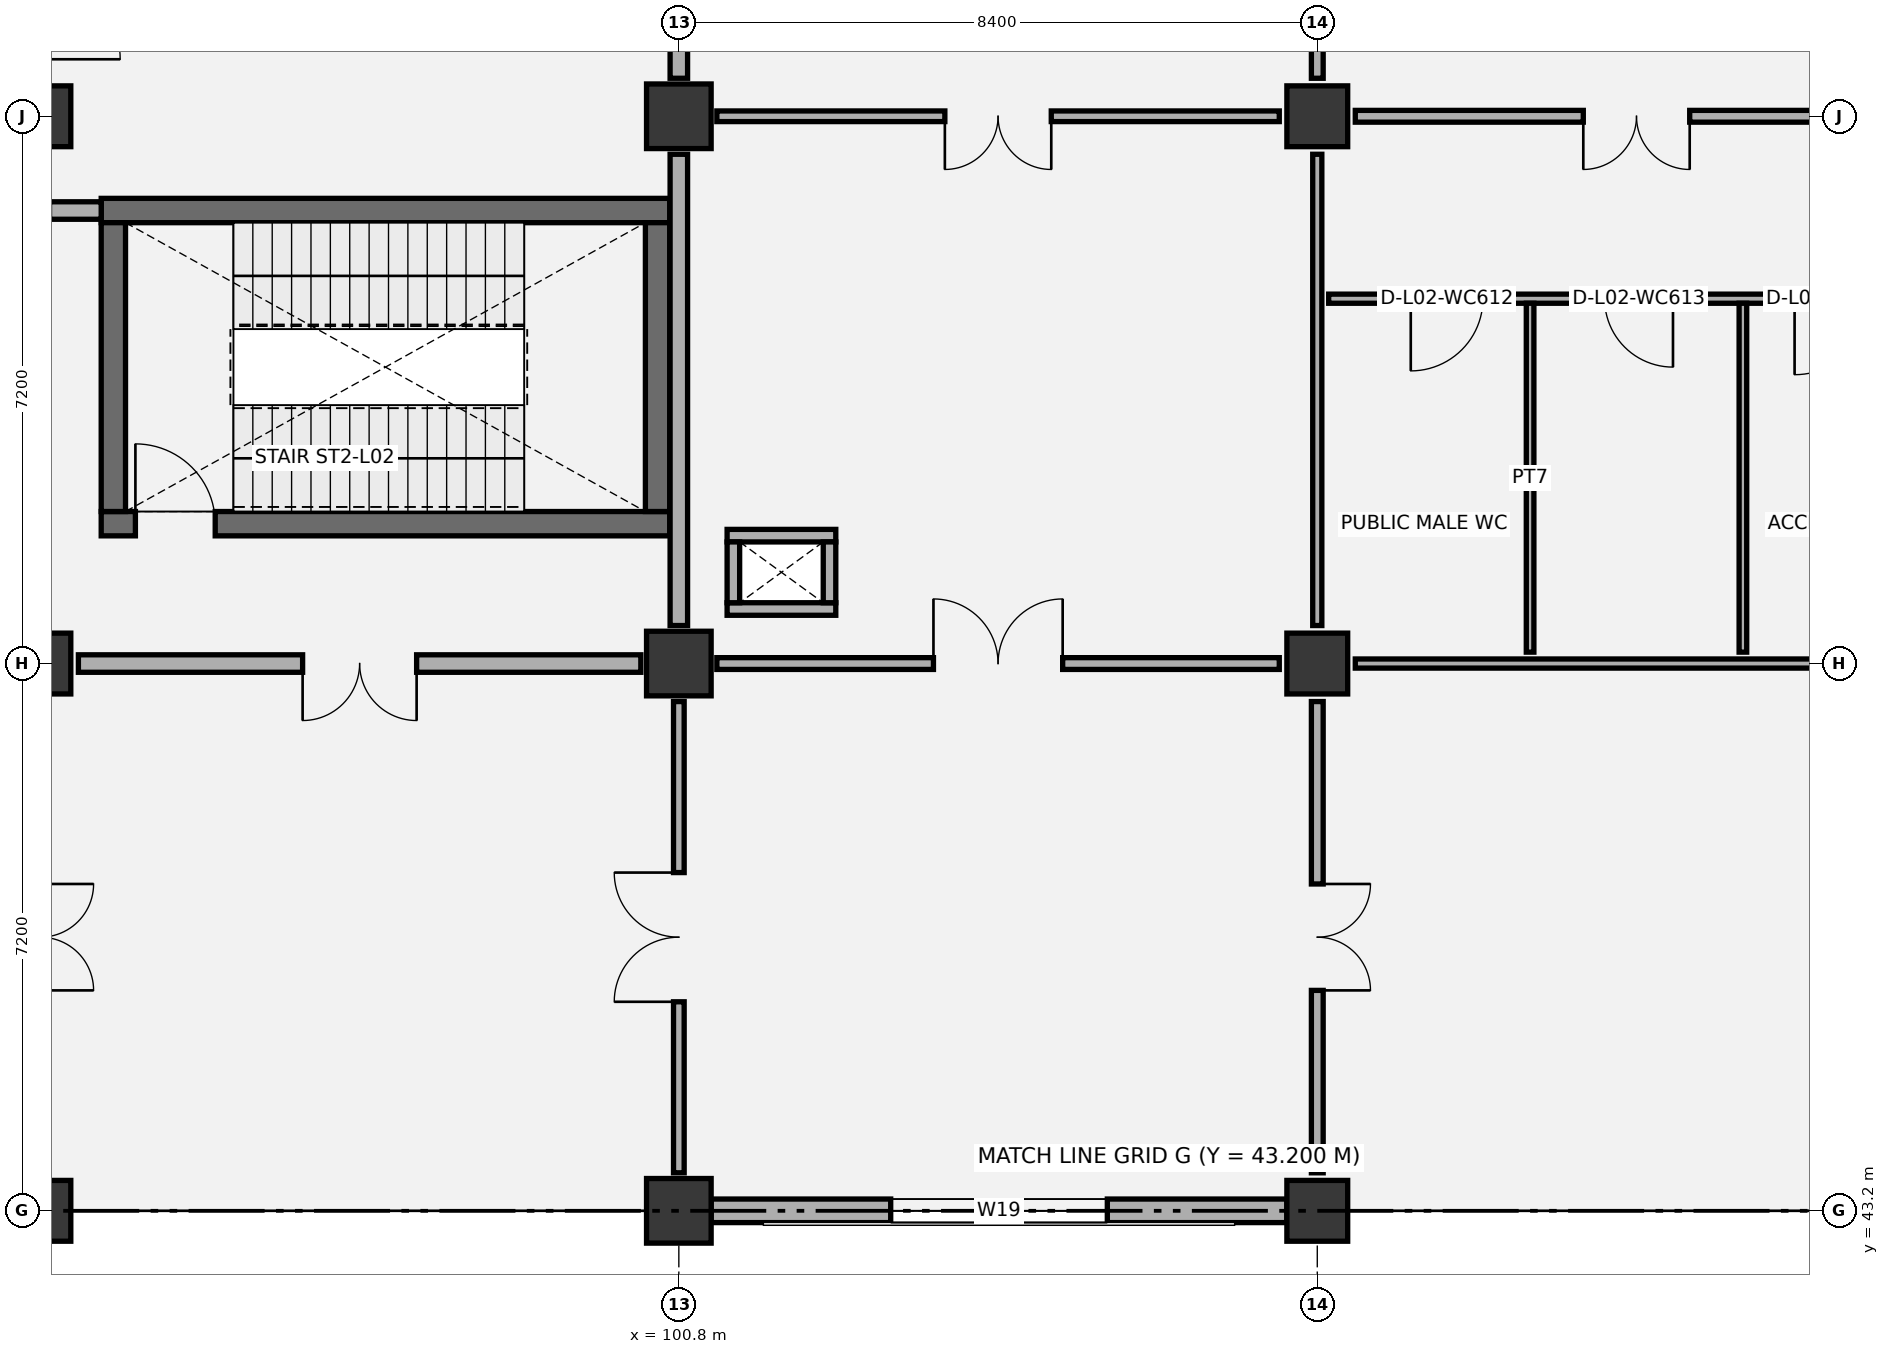
"""IFC4 building model, lengths in metres.
Left out: names, types, materials, properties, quantities, classifications, styles, units other than length and angle.
Written with IfcOpenShell. Run it as: python <this file> out.ifc"""

import sys

from ifc_helpers import new_model, si_unit, direction, frame, frame_2d, origin, origin_2d, place, context, subcontext, project, spatial, rectangle, extrude, element, fill, save


model = new_model("IFC4")
c1 = context("Model", 3, precision=1e-05, world=origin(), true_north=direction((0.0, 1.0)))
c2 = subcontext(c1, "Body", "Model", "MODEL_VIEW")
j1 = project(units=[si_unit("LENGTHUNIT", "METRE"), si_unit("PLANEANGLEUNIT", "RADIAN")], contexts=[c1])
p1 = place(None, origin())
s1 = spatial("IfcSite", under=j1, at=p1, CompositionType="ELEMENT")
p2 = place(p1, origin())
s2 = spatial("IfcBuilding", under=s1, at=p2, CompositionType="ELEMENT")
p3 = place(p2, frame((0.0, 0.0, 11.4)))
s3 = spatial("IfcBuildingStorey", under=s2, at=p3, CompositionType="ELEMENT", Elevation=11.4)
for number, where, z_axis, x_axis in (
    (1, (92.4, 43.2, 0.0), (0.0, 0.0, 1.0), (1.0, 0.0, 0.0)),
    (2, (92.4, 50.4, 0.0), (0.0, 0.0, 1.0), (1.0, 0.0, 0.0)),
    (3, (92.4, 57.6, 0.0), (0.0, 0.0, 1.0), (1.0, 0.0, 0.0)),
):
    element("IfcColumn", number, at=place(p3, frame(where, z_axis=z_axis, x_axis=x_axis)), inside=s3, PredefinedType="COLUMN", context=c2, shape_type="SweptSolid", body=[
        extrude(rectangle(XDim=0.8, YDim=0.8, at=origin_2d()), origin(), (0.0, 0.0, 1.0), 5.4),
    ])
for number, where, z_axis, x_axis in (
    (4, (100.8, 43.2, 0.0), (0.0, 0.0, 1.0), (1.0, 0.0, 0.0)),
    (5, (100.8, 50.4, 0.0), (0.0, 0.0, 1.0), (1.0, 0.0, 0.0)),
    (6, (100.8, 57.6, 0.0), (0.0, 0.0, 1.0), (1.0, 0.0, 0.0)),
):
    element("IfcColumn", number, at=place(p3, frame(where, z_axis=z_axis, x_axis=x_axis)), inside=s3, PredefinedType="COLUMN", context=c2, shape_type="SweptSolid", body=[
        extrude(rectangle(XDim=0.85, YDim=0.85, at=origin_2d()), origin(), (0.0, 0.0, 1.0), 5.4),
    ])
for number, where, z_axis, x_axis in (
    (7, (109.2, 43.2, 0.0), (0.0, 0.0, 1.0), (1.0, 0.0, 0.0)),
    (8, (109.2, 50.4, 0.0), (0.0, 0.0, 1.0), (1.0, 0.0, 0.0)),
    (9, (109.2, 57.6, 0.0), (0.0, 0.0, 1.0), (1.0, 0.0, 0.0)),
):
    element("IfcColumn", number, at=place(p3, frame(where, z_axis=z_axis, x_axis=x_axis)), inside=s3, PredefinedType="COLUMN", context=c2, shape_type="SweptSolid", body=[
        extrude(rectangle(XDim=0.8, YDim=0.8, at=origin_2d()), origin(), (0.0, 0.0, 1.0), 5.4),
    ])
p4 = place(p3, frame((93.2, 52.24, 0.0), z_axis=(0.0, 0.0, 1.0), x_axis=(1.0, 0.0, 0.0)))
e10 = element("IfcWall", 10, at=p4, inside=s3, PredefinedType="SHEAR", context=c2, shape_type="SweptSolid", body=[
    extrude(rectangle(XDim=7.48, YDim=0.32, at=frame_2d((3.74, 0.0))), origin(), (0.0, 0.0, 1.0), 5.1),
])
p5 = place(p4, frame((0.45, 0.0, 0.0)))
e11 = element("IfcOpeningElement", 11, at=p5, cuts=e10, PredefinedType="OPENING", context=c2, shape_type="SweptSolid", body=[
    extrude(rectangle(XDim=1.05, YDim=2.15, at=frame_2d((0.525, 1.075))), frame((0.0, 0.17, 0.0), z_axis=(0.0, -1.0, 0.0), x_axis=(1.0, 0.0, 0.0)), (0.0, 0.0, 1.0), 0.34),
])
p6 = place(p3, frame((93.2, 56.36, 0.0), z_axis=(0.0, 0.0, 1.0), x_axis=(1.0, 0.0, 0.0)))
e12 = element("IfcWall", 12, at=p6, inside=s3, PredefinedType="SHEAR", context=c2, shape_type="SweptSolid", body=[
    extrude(rectangle(XDim=7.48, YDim=0.32, at=frame_2d((3.74, 0.0))), origin(), (0.0, 0.0, 1.0), 5.1),
])
for number, where, z_axis, x_axis in (
    (13, (93.36, 52.4, 0.0), (0.0, 0.0, 1.0), (0.0, 1.0, 0.0)),
    (14, (100.52, 52.4, 0.0), (0.0, 0.0, 1.0), (0.0, 1.0, 0.0)),
):
    element("IfcWall", number, at=place(p3, frame(where, z_axis=z_axis, x_axis=x_axis)), inside=s3, PredefinedType="SHEAR", context=c2, shape_type="SweptSolid", body=[
        extrude(rectangle(XDim=3.8, YDim=0.32, at=frame_2d((1.9, 0.0))), origin(), (0.0, 0.0, 1.0), 5.1),
    ])
p7 = place(p3, frame((101.225, 43.2, 0.0), z_axis=(0.0, 0.0, 1.0), x_axis=(1.0, 0.0, 0.0)))
e15 = element("IfcWall", 15, at=p7, inside=s3, PredefinedType="SOLIDWALL", context=c2, shape_type="SweptSolid", body=[
    extrude(rectangle(XDim=7.575, YDim=0.31, at=frame_2d((3.788, 0.0))), origin(), (0.0, 0.0, 1.0), 4.445),
])
p8 = place(p7, frame((2.363, 0.0, 0.9)))
e16 = element("IfcOpeningElement", 16, at=p8, cuts=e15, PredefinedType="OPENING", context=c2, shape_type="SweptSolid", body=[
    extrude(rectangle(XDim=2.85, YDim=1.95, at=frame_2d((1.425, 0.975))), frame((0.0, 0.165, 0.0), z_axis=(0.0, -1.0, 0.0), x_axis=(1.0, 0.0, 0.0)), (0.0, 0.0, 1.0), 0.33),
])
for number, where, z_axis, x_axis in (
    (17, (101.435, 51.117, 0.0), (0.0, 0.0, 1.0), (1.0, 0.0, 0.0)),
    (18, (101.435, 52.083, 0.0), (0.0, 0.0, 1.0), (1.0, 0.0, 0.0)),
):
    element("IfcWall", number, at=place(p3, frame(where, z_axis=z_axis, x_axis=x_axis)), inside=s3, PredefinedType="PARTITIONING", context=c2, shape_type="SweptSolid", body=[
        extrude(rectangle(XDim=1.43, YDim=0.165, at=frame_2d((0.715, 0.0))), origin(), (0.0, 0.0, 1.0), 5.1),
    ])
for number, where, z_axis, x_axis in (
    (19, (101.518, 51.2, 0.0), (0.0, 0.0, 1.0), (0.0, 1.0, 0.0)),
    (20, (102.782, 51.2, 0.0), (0.0, 0.0, 1.0), (0.0, 1.0, 0.0)),
):
    element("IfcWall", number, at=place(p3, frame(where, z_axis=z_axis, x_axis=x_axis)), inside=s3, PredefinedType="PARTITIONING", context=c2, shape_type="SweptSolid", body=[
        extrude(rectangle(XDim=0.8, YDim=0.165, at=frame_2d((0.4, 0.0))), origin(), (0.0, 0.0, 1.0), 5.1),
    ])
p9 = place(p3, frame((109.35, 55.2, 0.0), z_axis=(0.0, 0.0, 1.0), x_axis=(1.0, 0.0, 0.0)))
e21 = element("IfcWall", 21, at=p9, inside=s3, PredefinedType="PARTITIONING", context=c2, shape_type="SweptSolid", body=[
    extrude(rectangle(XDim=8.1, YDim=0.12, at=frame_2d((4.05, 0.0))), origin(), (0.0, 0.0, 1.0), 5.1),
])
p10 = place(p9, frame((1.08, 0.0, 0.0)))
e22 = element("IfcOpeningElement", 22, at=p10, cuts=e21, PredefinedType="OPENING", context=c2, shape_type="SweptSolid", body=[
    extrude(rectangle(XDim=0.95, YDim=2.1, at=frame_2d((0.475, 1.05))), frame((0.0, 0.07, 0.0), z_axis=(0.0, -1.0, 0.0), x_axis=(1.0, 0.0, 0.0)), (0.0, 0.0, 1.0), 0.14),
])
p11 = place(p9, frame((3.63, 0.0, 0.0)))
e23 = element("IfcOpeningElement", 23, at=p11, cuts=e21, PredefinedType="OPENING", context=c2, shape_type="SweptSolid", body=[
    extrude(rectangle(XDim=0.9, YDim=2.1, at=frame_2d((0.45, 1.05))), frame((0.0, 0.07, 0.0), z_axis=(0.0, -1.0, 0.0), x_axis=(1.0, 0.0, 0.0)), (0.0, 0.0, 1.0), 0.14),
])
p12 = place(p9, frame((6.13, 0.0, 0.0)))
e24 = element("IfcOpeningElement", 24, at=p12, cuts=e21, PredefinedType="OPENING", context=c2, shape_type="SweptSolid", body=[
    extrude(rectangle(XDim=1.0, YDim=2.1, at=frame_2d((0.5, 1.05))), frame((0.0, 0.07, 0.0), z_axis=(0.0, -1.0, 0.0), x_axis=(1.0, 0.0, 0.0)), (0.0, 0.0, 1.0), 0.14),
])
for number, where, z_axis, x_axis in (
    (25, (112.0, 50.55, 0.0), (0.0, 0.0, 1.0), (0.0, 1.0, 0.0)),
    (26, (114.8, 50.55, 0.0), (0.0, 0.0, 1.0), (0.0, 1.0, 0.0)),
):
    element("IfcWall", number, at=place(p3, frame(where, z_axis=z_axis, x_axis=x_axis)), inside=s3, PredefinedType="PARTITIONING", context=c2, shape_type="SweptSolid", body=[
        extrude(rectangle(XDim=4.59, YDim=0.1, at=frame_2d((2.295, 0.0))), origin(), (0.0, 0.0, 1.0), 5.1),
    ])
p13 = place(p3, frame((100.8, 43.7, 0.0), z_axis=(0.0, 0.0, 1.0), x_axis=(0.0, 1.0, 0.0)))
e27 = element("IfcWall", 27, at=p13, inside=s3, PredefinedType="PARTITIONING", context=c2, shape_type="SweptSolid", body=[
    extrude(rectangle(XDim=6.2, YDim=0.14, at=frame_2d((3.1, 0.0))), origin(), (0.0, 0.0, 1.0), 4.805),
])
p14 = place(p13, frame((2.25, 0.0, 0.0)))
e28 = element("IfcOpeningElement", 28, at=p14, cuts=e27, PredefinedType="OPENING", context=c2, shape_type="SweptSolid", body=[
    extrude(rectangle(XDim=1.7, YDim=2.25, at=frame_2d((0.85, 1.125))), frame((0.0, 0.08, 0.0), z_axis=(0.0, -1.0, 0.0), x_axis=(1.0, 0.0, 0.0)), (0.0, 0.0, 1.0), 0.16),
])
p15 = place(p3, frame((92.9, 50.4, 0.0), z_axis=(0.0, 0.0, 1.0), x_axis=(1.0, 0.0, 0.0)))
e29 = element("IfcWall", 29, at=p15, inside=s3, PredefinedType="PARTITIONING", context=c2, shape_type="SweptSolid", body=[
    extrude(rectangle(XDim=7.4, YDim=0.23, at=frame_2d((3.7, 0.0))), origin(), (0.0, 0.0, 1.0), 4.345),
])
p16 = place(p15, frame((2.95, 0.0, 0.0)))
e30 = element("IfcOpeningElement", 30, at=p16, cuts=e29, PredefinedType="OPENING", context=c2, shape_type="SweptSolid", body=[
    extrude(rectangle(XDim=1.5, YDim=2.15, at=frame_2d((0.75, 1.075))), frame((0.0, 0.125, 0.0), z_axis=(0.0, -1.0, 0.0), x_axis=(1.0, 0.0, 0.0)), (0.0, 0.0, 1.0), 0.25),
])
p17 = place(p3, frame((100.8, 50.9, 0.0), z_axis=(0.0, 0.0, 1.0), x_axis=(0.0, 1.0, 0.0)))
e31 = element("IfcWall", 31, at=p17, inside=s3, PredefinedType="PARTITIONING", context=c2, shape_type="SweptSolid", body=[
    extrude(rectangle(XDim=6.2, YDim=0.23, at=frame_2d((3.1, 0.0))), origin(), (0.0, 0.0, 1.0), 4.395),
])
p18 = place(p3, frame((92.52, 56.36, 0.0), z_axis=(0.0, 0.0, 1.0), x_axis=(1.0, 0.0, 0.0)))
e32 = element("IfcWall", 32, at=p18, inside=s3, PredefinedType="PARTITIONING", context=c2, shape_type="SweptSolid", body=[
    extrude(rectangle(XDim=0.68, YDim=0.23, at=frame_2d((0.34, 0.0))), origin(), (0.0, 0.0, 1.0), 5.1),
])
p19 = place(p3, frame((100.8, 58.1, 0.0), z_axis=(0.0, 0.0, 1.0), x_axis=(0.0, 1.0, 0.0)))
e33 = element("IfcWall", 33, at=p19, inside=s3, PredefinedType="PARTITIONING", context=c2, shape_type="SweptSolid", body=[
    extrude(rectangle(XDim=6.2, YDim=0.23, at=frame_2d((3.1, 0.0))), origin(), (0.0, 0.0, 1.0), 4.595),
])
p20 = place(p3, frame((109.2, 43.7, 0.0), z_axis=(0.0, 0.0, 1.0), x_axis=(0.0, 1.0, 0.0)))
e34 = element("IfcWall", 34, at=p20, inside=s3, PredefinedType="PARTITIONING", context=c2, shape_type="SweptSolid", body=[
    extrude(rectangle(XDim=6.2, YDim=0.155, at=frame_2d((3.1, 0.0))), origin(), (0.0, 0.0, 1.0), 4.395),
])
p21 = place(p20, frame((2.4, 0.0, 0.0)))
e35 = element("IfcOpeningElement", 35, at=p21, cuts=e34, PredefinedType="OPENING", context=c2, shape_type="SweptSolid", body=[
    extrude(rectangle(XDim=1.4, YDim=2.15, at=frame_2d((0.7, 1.075))), frame((0.0, 0.087, 0.0), z_axis=(0.0, -1.0, 0.0), x_axis=(1.0, 0.0, 0.0)), (0.0, 0.0, 1.0), 0.175),
])
p22 = place(p3, frame((101.3, 50.4, 0.0), z_axis=(0.0, 0.0, 1.0), x_axis=(1.0, 0.0, 0.0)))
e36 = element("IfcWall", 36, at=p22, inside=s3, PredefinedType="PARTITIONING", context=c2, shape_type="SweptSolid", body=[
    extrude(rectangle(XDim=7.4, YDim=0.155, at=frame_2d((3.7, 0.0))), origin(), (0.0, 0.0, 1.0), 4.345),
])
p23 = place(p22, frame((2.85, 0.0, 0.0)))
e37 = element("IfcOpeningElement", 37, at=p23, cuts=e36, PredefinedType="OPENING", context=c2, shape_type="SweptSolid", body=[
    extrude(rectangle(XDim=1.7, YDim=2.25, at=frame_2d((0.85, 1.125))), frame((0.0, 0.087, 0.0), z_axis=(0.0, -1.0, 0.0), x_axis=(1.0, 0.0, 0.0)), (0.0, 0.0, 1.0), 0.175),
])
p24 = place(p3, frame((109.2, 50.9, 0.0), z_axis=(0.0, 0.0, 1.0), x_axis=(0.0, 1.0, 0.0)))
e38 = element("IfcWall", 38, at=p24, inside=s3, PredefinedType="PARTITIONING", context=c2, shape_type="SweptSolid", body=[
    extrude(rectangle(XDim=6.2, YDim=0.12, at=frame_2d((3.1, 0.0))), origin(), (0.0, 0.0, 1.0), 4.595),
])
p25 = place(p3, frame((101.3, 57.6, 0.0), z_axis=(0.0, 0.0, 1.0), x_axis=(1.0, 0.0, 0.0)))
e39 = element("IfcWall", 39, at=p25, inside=s3, PredefinedType="PARTITIONING", context=c2, shape_type="SweptSolid", body=[
    extrude(rectangle(XDim=7.4, YDim=0.14, at=frame_2d((3.7, 0.0))), origin(), (0.0, 0.0, 1.0), 4.345),
])
p26 = place(p25, frame((3.0, 0.0, 0.0)))
e40 = element("IfcOpeningElement", 40, at=p26, cuts=e39, PredefinedType="OPENING", context=c2, shape_type="SweptSolid", body=[
    extrude(rectangle(XDim=1.4, YDim=2.15, at=frame_2d((0.7, 1.075))), frame((0.0, 0.08, 0.0), z_axis=(0.0, -1.0, 0.0), x_axis=(1.0, 0.0, 0.0)), (0.0, 0.0, 1.0), 0.16),
])
p27 = place(p3, frame((109.2, 58.1, 0.0), z_axis=(0.0, 0.0, 1.0), x_axis=(0.0, 1.0, 0.0)))
e41 = element("IfcWall", 41, at=p27, inside=s3, PredefinedType="PARTITIONING", context=c2, shape_type="SweptSolid", body=[
    extrude(rectangle(XDim=6.2, YDim=0.155, at=frame_2d((3.1, 0.0))), origin(), (0.0, 0.0, 1.0), 4.395),
])
p28 = place(p27, frame((2.25, 0.0, 0.0)))
e42 = element("IfcOpeningElement", 42, at=p28, cuts=e41, PredefinedType="OPENING", context=c2, shape_type="SweptSolid", body=[
    extrude(rectangle(XDim=1.7, YDim=2.25, at=frame_2d((0.85, 1.125))), frame((0.0, 0.087, 0.0), z_axis=(0.0, -1.0, 0.0), x_axis=(1.0, 0.0, 0.0)), (0.0, 0.0, 1.0), 0.175),
])
p29 = place(p3, frame((109.7, 50.4, 0.0), z_axis=(0.0, 0.0, 1.0), x_axis=(1.0, 0.0, 0.0)))
e43 = element("IfcWall", 43, at=p29, inside=s3, PredefinedType="PARTITIONING", context=c2, shape_type="SweptSolid", body=[
    extrude(rectangle(XDim=7.4, YDim=0.12, at=frame_2d((3.7, 0.0))), origin(), (0.0, 0.0, 1.0), 4.345),
])
p30 = place(p3, frame((109.7, 57.6, 0.0), z_axis=(0.0, 0.0, 1.0), x_axis=(1.0, 0.0, 0.0)))
e44 = element("IfcWall", 44, at=p30, inside=s3, PredefinedType="PARTITIONING", context=c2, shape_type="SweptSolid", body=[
    extrude(rectangle(XDim=7.4, YDim=0.155, at=frame_2d((3.7, 0.0))), origin(), (0.0, 0.0, 1.0), 4.345),
])
p31 = place(p30, frame((3.0, 0.0, 0.0)))
e45 = element("IfcOpeningElement", 45, at=p31, cuts=e44, PredefinedType="OPENING", context=c2, shape_type="SweptSolid", body=[
    extrude(rectangle(XDim=1.4, YDim=2.15, at=frame_2d((0.7, 1.075))), frame((0.0, 0.087, 0.0), z_axis=(0.0, -1.0, 0.0), x_axis=(1.0, 0.0, 0.0)), (0.0, 0.0, 1.0), 0.175),
])
p32 = place(p8, origin())
e46 = element("IfcWindow", 46, at=p32, inside=s3, PartitioningType="SINGLE_PANEL", PredefinedType="WINDOW", context=c2, shape_type="SweptSolid", body=[
    extrude(rectangle(XDim=2.85, YDim=1.95, at=frame_2d((1.425, 0.975))), frame((0.0, 0.03, 0.0), z_axis=(0.0, -1.0, 0.0), x_axis=(1.0, 0.0, 0.0)), (0.0, 0.0, 1.0), 0.06),
])
fill(e16, e46)
p33 = place(p5, origin())
e47 = element("IfcDoor", 47, at=p33, inside=s3, OperationType="SINGLE_SWING_LEFT", PredefinedType="DOOR", context=c2, shape_type="SweptSolid", body=[
    extrude(rectangle(XDim=1.05, YDim=2.15, at=frame_2d((0.525, 1.075))), frame((0.0, 0.025, 0.0), z_axis=(0.0, -1.0, 0.0), x_axis=(1.0, 0.0, 0.0)), (0.0, 0.0, 1.0), 0.05),
])
fill(e11, e47)
p34 = place(p10, frame((0.95, 0.0, 0.0), z_axis=(0.0, 0.0, 1.0), x_axis=(-1.0, 0.0, 0.0)))
e48 = element("IfcDoor", 48, at=p34, inside=s3, OperationType="SINGLE_SWING_RIGHT", PredefinedType="DOOR", context=c2, shape_type="SweptSolid", body=[
    extrude(rectangle(XDim=0.95, YDim=2.1, at=frame_2d((0.475, 1.05))), frame((0.0, 0.025, 0.0), z_axis=(0.0, -1.0, 0.0), x_axis=(1.0, 0.0, 0.0)), (0.0, 0.0, 1.0), 0.05),
])
fill(e22, e48)
p35 = place(p11, frame((0.9, 0.0, 0.0), z_axis=(0.0, 0.0, 1.0), x_axis=(-1.0, 0.0, 0.0)))
e49 = element("IfcDoor", 49, at=p35, inside=s3, OperationType="SINGLE_SWING_LEFT", PredefinedType="DOOR", context=c2, shape_type="SweptSolid", body=[
    extrude(rectangle(XDim=0.9, YDim=2.1, at=frame_2d((0.45, 1.05))), frame((0.0, 0.025, 0.0), z_axis=(0.0, -1.0, 0.0), x_axis=(1.0, 0.0, 0.0)), (0.0, 0.0, 1.0), 0.05),
])
fill(e23, e49)
p36 = place(p12, frame((1.0, 0.0, 0.0), z_axis=(0.0, 0.0, 1.0), x_axis=(-1.0, 0.0, 0.0)))
e50 = element("IfcDoor", 50, at=p36, inside=s3, OperationType="SINGLE_SWING_RIGHT", PredefinedType="DOOR", context=c2, shape_type="SweptSolid", body=[
    extrude(rectangle(XDim=1.0, YDim=2.1, at=frame_2d((0.5, 1.05))), frame((0.0, 0.025, 0.0), z_axis=(0.0, -1.0, 0.0), x_axis=(1.0, 0.0, 0.0)), (0.0, 0.0, 1.0), 0.05),
])
fill(e24, e50)
p37 = place(p14, origin())
e51 = element("IfcDoor", 51, at=p37, inside=s3, OperationType="DOUBLE_DOOR_SINGLE_SWING", PredefinedType="DOOR", context=c2, shape_type="SweptSolid", body=[
    extrude(rectangle(XDim=1.7, YDim=2.25, at=frame_2d((0.85, 1.125))), frame((0.0, 0.025, 0.0), z_axis=(0.0, -1.0, 0.0), x_axis=(1.0, 0.0, 0.0)), (0.0, 0.0, 1.0), 0.05),
])
fill(e28, e51)
p38 = place(p16, frame((1.5, 0.0, 0.0), z_axis=(0.0, 0.0, 1.0), x_axis=(-1.0, 0.0, 0.0)))
e52 = element("IfcDoor", 52, at=p38, inside=s3, OperationType="DOUBLE_DOOR_SINGLE_SWING", PredefinedType="DOOR", context=c2, shape_type="SweptSolid", body=[
    extrude(rectangle(XDim=1.5, YDim=2.15, at=frame_2d((0.75, 1.075))), frame((0.0, 0.025, 0.0), z_axis=(0.0, -1.0, 0.0), x_axis=(1.0, 0.0, 0.0)), (0.0, 0.0, 1.0), 0.05),
])
fill(e30, e52)
p39 = place(p21, frame((1.4, 0.0, 0.0), z_axis=(0.0, 0.0, 1.0), x_axis=(-1.0, 0.0, 0.0)))
e53 = element("IfcDoor", 53, at=p39, inside=s3, OperationType="DOUBLE_DOOR_SINGLE_SWING", PredefinedType="DOOR", context=c2, shape_type="SweptSolid", body=[
    extrude(rectangle(XDim=1.4, YDim=2.15, at=frame_2d((0.7, 1.075))), frame((0.0, 0.025, 0.0), z_axis=(0.0, -1.0, 0.0), x_axis=(1.0, 0.0, 0.0)), (0.0, 0.0, 1.0), 0.05),
])
fill(e35, e53)
p40 = place(p23, origin())
e54 = element("IfcDoor", 54, at=p40, inside=s3, OperationType="DOUBLE_DOOR_SINGLE_SWING", PredefinedType="DOOR", context=c2, shape_type="SweptSolid", body=[
    extrude(rectangle(XDim=1.7, YDim=2.25, at=frame_2d((0.85, 1.125))), frame((0.0, 0.025, 0.0), z_axis=(0.0, -1.0, 0.0), x_axis=(1.0, 0.0, 0.0)), (0.0, 0.0, 1.0), 0.05),
])
fill(e37, e54)
p41 = place(p26, frame((1.4, 0.0, 0.0), z_axis=(0.0, 0.0, 1.0), x_axis=(-1.0, 0.0, 0.0)))
e55 = element("IfcDoor", 55, at=p41, inside=s3, OperationType="DOUBLE_DOOR_SINGLE_SWING", PredefinedType="DOOR", context=c2, shape_type="SweptSolid", body=[
    extrude(rectangle(XDim=1.4, YDim=2.15, at=frame_2d((0.7, 1.075))), frame((0.0, 0.025, 0.0), z_axis=(0.0, -1.0, 0.0), x_axis=(1.0, 0.0, 0.0)), (0.0, 0.0, 1.0), 0.05),
])
fill(e40, e55)
p42 = place(p31, frame((1.4, 0.0, 0.0), z_axis=(0.0, 0.0, 1.0), x_axis=(-1.0, 0.0, 0.0)))
e56 = element("IfcDoor", 56, at=p42, inside=s3, OperationType="DOUBLE_DOOR_SINGLE_SWING", PredefinedType="DOOR", context=c2, shape_type="SweptSolid", body=[
    extrude(rectangle(XDim=1.4, YDim=2.15, at=frame_2d((0.7, 1.075))), frame((0.0, 0.025, 0.0), z_axis=(0.0, -1.0, 0.0), x_axis=(1.0, 0.0, 0.0)), (0.0, 0.0, 1.0), 0.05),
])
fill(e45, e56)
save(model, sys.argv[1])
